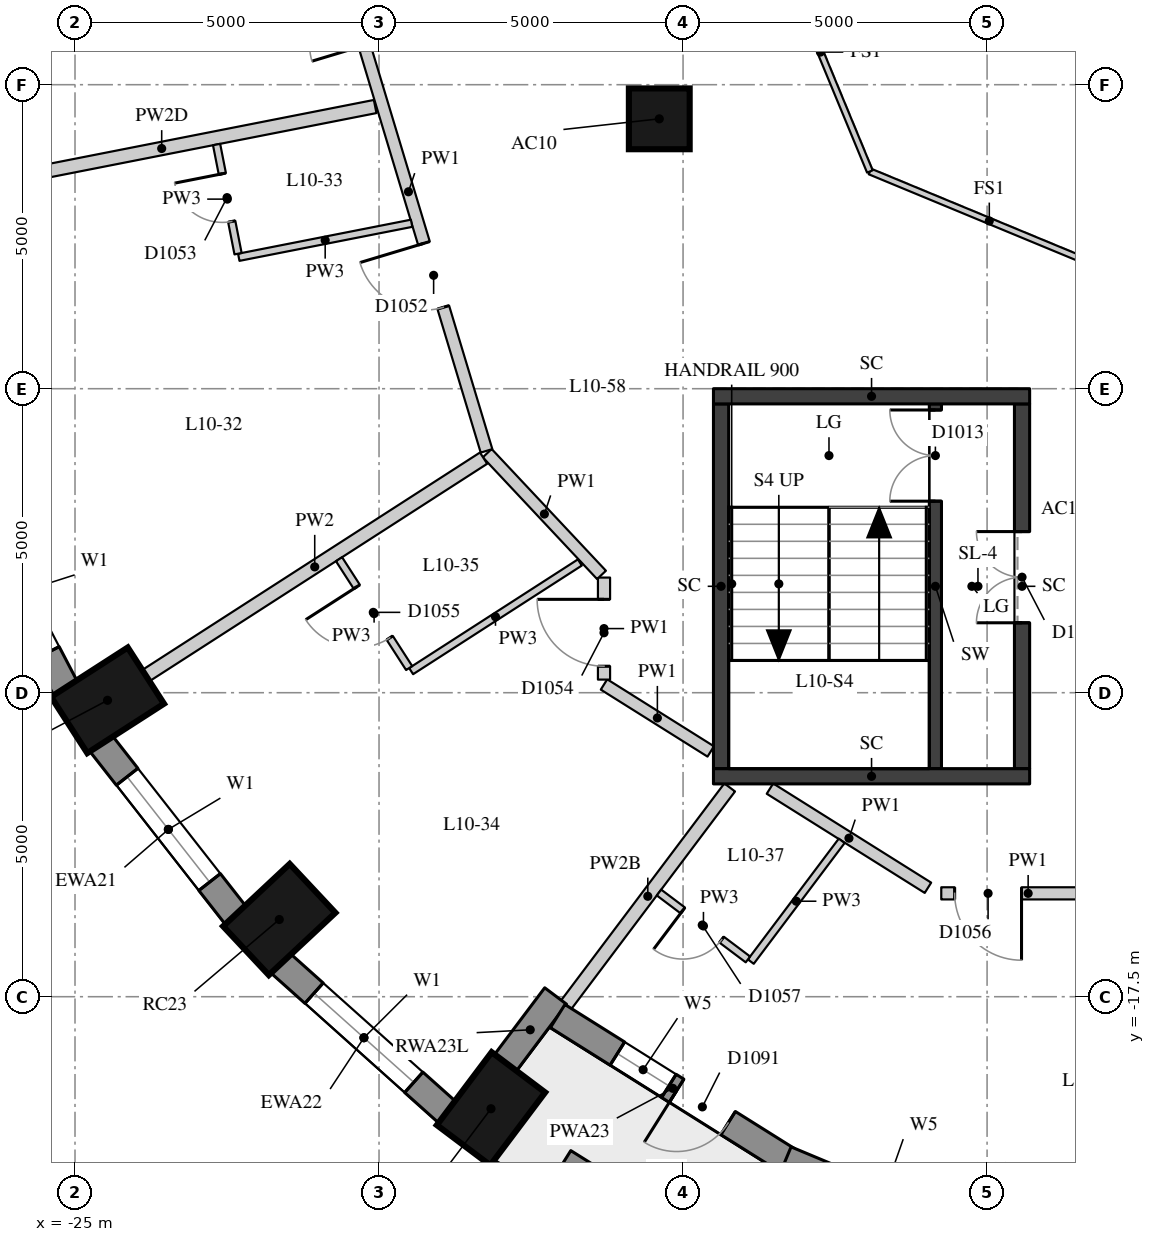
"""IFC4 building model, lengths in metres.
Left out: names, types, materials, properties, quantities, classifications, styles, units other than length and angle.
Written with IfcOpenShell. Run it as: python <this file> out.ifc"""

import sys

from ifc_helpers import new_model, si_unit, direction, frame, frame_2d, origin, origin_2d, place, context, subcontext, project, spatial, rectangle, extrude, element, fill, save


model = new_model("IFC4")
c1 = context("Model", 3, precision=1e-05, world=origin(), true_north=direction((0.0, 1.0)))
c2 = subcontext(c1, "Body", "Model", "MODEL_VIEW")
j1 = project(units=[si_unit("LENGTHUNIT", "METRE"), si_unit("PLANEANGLEUNIT", "RADIAN")], contexts=[c1])
p1 = place(None, origin())
s1 = spatial("IfcSite", under=j1, at=p1, CompositionType="ELEMENT")
p2 = place(p1, origin())
s2 = spatial("IfcBuilding", under=s1, at=p2, CompositionType="ELEMENT")
p3 = place(p2, frame((0.0, 0.0, 41.5)))
s3 = spatial("IfcBuildingStorey", under=s2, at=p3, CompositionType="ELEMENT", Elevation=41.5)
for number, where, z_axis, x_axis in (
    (1, (-24.465, -12.625, 0.0), (0.0, 0.0, 1.0), (-0.841, -0.541, 0.0)),
    (2, (-21.641, -16.23, 0.0), (0.0, 0.0, 1.0), (-0.73, -0.683, 0.0)),
    (3, (-18.159, -19.343, 0.0), (0.0, 0.0, 1.0), (-0.601, -0.799, 0.0)),
):
    element("IfcColumn", number, at=place(p3, frame(where, z_axis=z_axis, x_axis=x_axis)), inside=s3, PredefinedType="COLUMN", context=c2, shape_type="SweptSolid", body=[
        extrude(rectangle(XDim=1.5, YDim=1.1, at=origin_2d()), origin(), (0.0, 0.0, 1.0), 3.3),
    ])
p4 = place(p3, frame((-15.391, -3.062, 0.0), z_axis=(0.0, 0.0, 1.0), x_axis=(1.0, 0.0, 0.0)))
e4 = element("IfcColumn", 4, at=p4, inside=s3, PredefinedType="COLUMN", context=c2, shape_type="SweptSolid", body=[
    extrude(rectangle(XDim=1.0, YDim=1.0, at=origin_2d()), origin(), (0.0, 0.0, 1.0), 3.3),
])
p5 = place(p3, frame((-26.786, -9.305, 0.0), z_axis=(0.0, 0.0, 1.0), x_axis=(0.462492775226, -0.886623050041, 0.0)))
e5 = element("IfcWall", 5, at=p5, inside=s3, PredefinedType="SOLIDWALL", context=c2, shape_type="SweptSolid", body=[
    extrude(rectangle(XDim=3.532, YDim=0.45, at=frame_2d((1.766, 0.0))), origin(), (0.0, 0.0, 1.0), 3.02),
])
p6 = place(p5, frame((0.666, 0.0, 0.4)))
e6 = element("IfcOpeningElement", 6, at=p6, cuts=e5, PredefinedType="OPENING", context=c2, shape_type="SweptSolid", body=[
    extrude(rectangle(XDim=2.2, YDim=1.75, at=frame_2d((1.1, 0.875))), frame((0.0, 0.235, 0.0), z_axis=(0.0, -1.0, 0.0), x_axis=(1.0, 0.0, 0.0)), (0.0, 0.0, 1.0), 0.47),
])
p7 = place(p3, frame((-24.578, -13.328, 0.0), z_axis=(0.0, 0.0, 1.0), x_axis=(0.616661975264, -0.787228053529, 0.0)))
e7 = element("IfcWall", 7, at=p7, inside=s3, PredefinedType="SOLIDWALL", context=c2, shape_type="SweptSolid", body=[
    extrude(rectangle(XDim=3.61, YDim=0.45, at=frame_2d((1.805, 0.0))), origin(), (0.0, 0.0, 1.0), 3.02),
])
p8 = place(p7, frame((0.705, 0.0, 0.4)))
e8 = element("IfcOpeningElement", 8, at=p8, cuts=e7, PredefinedType="OPENING", context=c2, shape_type="SweptSolid", body=[
    extrude(rectangle(XDim=2.2, YDim=1.75, at=frame_2d((1.1, 0.875))), frame((0.0, 0.235, 0.0), z_axis=(0.0, -1.0, 0.0), x_axis=(1.0, 0.0, 0.0)), (0.0, 0.0, 1.0), 0.47),
])
p9 = place(p3, frame((-21.627, -16.943, 0.0), z_axis=(0.0, 0.0, 1.0), x_axis=(0.745526233716, -0.66647628228, 0.0)))
e9 = element("IfcWall", 9, at=p9, inside=s3, PredefinedType="SOLIDWALL", context=c2, shape_type="SweptSolid", body=[
    extrude(rectangle(XDim=3.697, YDim=0.45, at=frame_2d((1.848, 0.0))), origin(), (0.0, 0.0, 1.0), 3.02),
])
p10 = place(p9, frame((0.749, 0.0, 0.4)))
e10 = element("IfcOpeningElement", 10, at=p10, cuts=e9, PredefinedType="OPENING", context=c2, shape_type="SweptSolid", body=[
    extrude(rectangle(XDim=2.2, YDim=1.75, at=frame_2d((1.1, 0.875))), frame((0.0, 0.235, 0.0), z_axis=(0.0, -1.0, 0.0), x_axis=(1.0, 0.0, 0.0)), (0.0, 0.0, 1.0), 0.47),
])
p11 = place(p3, frame((-17.932, -18.6, 0.0), z_axis=(0.0, 0.0, 1.0), x_axis=(0.601262851241, 0.799051302306, 0.0)))
e11 = element("IfcWall", 11, at=p11, inside=s3, PredefinedType="SOLIDWALL", context=c2, shape_type="SweptSolid", body=[
    extrude(rectangle(XDim=1.391, YDim=0.45, at=frame_2d((0.696, 0.0))), origin(), (0.0, 0.0, 1.0), 2.57),
])
p12 = place(p3, frame((-17.062, -17.819, 0.0), z_axis=(0.0, 0.0, 1.0), x_axis=(0.846990101364, -0.531608660757, 0.0)))
e12 = element("IfcWall", 12, at=p12, inside=s3, PredefinedType="SOLIDWALL", context=c2, shape_type="SweptSolid", body=[
    extrude(rectangle(XDim=4.469, YDim=0.45, at=frame_2d((2.234, 0.0))), origin(), (0.0, 0.0, 1.0), 3.02),
])
p13 = place(p12, frame((1.159, 0.0, 0.4)))
e13 = element("IfcOpeningElement", 13, at=p13, cuts=e12, PredefinedType="OPENING", context=c2, shape_type="SweptSolid", body=[
    extrude(rectangle(XDim=1.0, YDim=1.75, at=frame_2d((0.5, 0.875))), frame((0.0, 0.235, 0.0), z_axis=(0.0, -1.0, 0.0), x_axis=(1.0, 0.0, 0.0)), (0.0, 0.0, 1.0), 0.47),
])
p14 = place(p12, frame((2.31, 0.0, 0.0)))
e14 = element("IfcOpeningElement", 14, at=p14, cuts=e12, PredefinedType="OPENING", context=c2, shape_type="SweptSolid", body=[
    extrude(rectangle(XDim=1.0, YDim=2.15, at=frame_2d((0.5, 1.075))), frame((0.0, 0.235, 0.0), z_axis=(0.0, -1.0, 0.0), x_axis=(1.0, 0.0, 0.0)), (0.0, 0.0, 1.0), 0.47),
])
p15 = place(p3, frame((-13.31, -20.178, 0.0), z_axis=(0.0, 0.0, 1.0), x_axis=(0.922634412489, -0.385675693935, 0.0)))
e15 = element("IfcWall", 15, at=p15, inside=s3, PredefinedType="SOLIDWALL", context=c2, shape_type="SweptSolid", body=[
    extrude(rectangle(XDim=4.577, YDim=0.45, at=frame_2d((2.288, 0.0))), origin(), (0.0, 0.0, 1.0), 3.02),
])
p16 = place(p15, frame((1.213, 0.0, 0.4)))
e16 = element("IfcOpeningElement", 16, at=p16, cuts=e15, PredefinedType="OPENING", context=c2, shape_type="SweptSolid", body=[
    extrude(rectangle(XDim=1.0, YDim=1.75, at=frame_2d((0.5, 0.875))), frame((0.0, 0.235, 0.0), z_axis=(0.0, -1.0, 0.0), x_axis=(1.0, 0.0, 0.0)), (0.0, 0.0, 1.0), 0.47),
])
p17 = place(p15, frame((2.363, 0.0, 0.0)))
e17 = element("IfcOpeningElement", 17, at=p17, cuts=e15, PredefinedType="OPENING", context=c2, shape_type="SweptSolid", body=[
    extrude(rectangle(XDim=1.0, YDim=2.15, at=frame_2d((0.5, 1.075))), frame((0.0, 0.235, 0.0), z_axis=(0.0, -1.0, 0.0), x_axis=(1.0, 0.0, 0.0)), (0.0, 0.0, 1.0), 0.47),
])
p18 = place(p3, frame((-17.032, -20.328, 0.0), z_axis=(0.0, 0.0, 1.0), x_axis=(0.847609446823, -0.530620604252, 0.0)))
e18 = element("IfcWall", 18, at=p18, inside=s3, PredefinedType="USERDEFINED", context=c2, shape_type="SweptSolid", body=[
    extrude(rectangle(XDim=1.8, YDim=0.7, at=frame_2d((0.9, 0.0))), origin(), (0.0, 0.0, 1.0), 0.75),
])
p19 = place(p3, frame((-10.85, -13.75, 0.0), z_axis=(0.0, 0.0, 1.0), x_axis=(0.0, 1.0, 0.0)))
e19 = element("IfcWall", 19, at=p19, inside=s3, PredefinedType="SHEAR", context=c2, shape_type="SweptSolid", body=[
    extrude(rectangle(XDim=6.0, YDim=0.2, at=frame_2d((3.0, 0.0))), origin(), (0.0, 0.0, 1.0), 3.02),
])
p20 = place(p19, frame((4.4, 0.0, 0.0)))
e20 = element("IfcOpeningElement", 20, at=p20, cuts=e19, PredefinedType="OPENING", context=c2, shape_type="SweptSolid", body=[
    extrude(rectangle(XDim=1.5, YDim=2.1, at=frame_2d((0.75, 1.05))), frame((0.0, 0.11, 0.0), z_axis=(0.0, -1.0, 0.0), x_axis=(1.0, 0.0, 0.0)), (0.0, 0.0, 1.0), 0.22),
])
p21 = place(p3, frame((-14.375, -13.75, -0.28), z_axis=(0.0, 0.0, 1.0), x_axis=(0.0, 1.0, 0.0)))
e21 = element("IfcWall", 21, at=p21, inside=s3, PredefinedType="SHEAR", context=c2, shape_type="SweptSolid", body=[
    extrude(rectangle(XDim=6.0, YDim=0.25, at=frame_2d((3.0, 0.0))), origin(), (0.0, 0.0, 1.0), 3.3),
])
p22 = place(p3, frame((-9.425, -13.75, -0.28), z_axis=(0.0, 0.0, 1.0), x_axis=(0.0, 1.0, 0.0)))
e22 = element("IfcWall", 22, at=p22, inside=s3, PredefinedType="SHEAR", context=c2, shape_type="SweptSolid", body=[
    extrude(rectangle(XDim=6.0, YDim=0.25, at=frame_2d((3.0, 0.0))), origin(), (0.0, 0.0, 1.0), 3.3),
])
p23 = place(p22, frame((2.4, 0.0, 0.28)))
e23 = element("IfcOpeningElement", 23, at=p23, cuts=e22, PredefinedType="OPENING", context=c2, shape_type="SweptSolid", body=[
    extrude(rectangle(XDim=1.5, YDim=2.1, at=frame_2d((0.75, 1.05))), frame((0.0, 0.135, 0.0), z_axis=(0.0, -1.0, 0.0), x_axis=(1.0, 0.0, 0.0)), (0.0, 0.0, 1.0), 0.27),
])
for number, where, z_axis, x_axis in (
    (24, (-14.5, -7.625, -0.28), (0.0, 0.0, 1.0), (1.0, 0.0, 0.0)),
    (25, (-14.5, -13.875, -0.28), (0.0, 0.0, 1.0), (1.0, 0.0, 0.0)),
):
    element("IfcWall", number, at=place(p3, frame(where, z_axis=z_axis, x_axis=x_axis)), inside=s3, PredefinedType="SHEAR", context=c2, shape_type="SweptSolid", body=[
        extrude(rectangle(XDim=5.2, YDim=0.25, at=frame_2d((2.6, 0.0))), origin(), (0.0, 0.0, 1.0), 3.3),
    ])
p24 = place(p3, frame((-14.545, -13.466, 0.0), z_axis=(0.0, 0.0, 1.0), x_axis=(-0.846977572949, 0.53162862124, 0.0)))
e26 = element("IfcWall", 26, at=p24, inside=s3, PredefinedType="PARTITIONING", context=c2, shape_type="SweptSolid", body=[
    extrude(rectangle(XDim=2.073, YDim=0.2, at=frame_2d((1.036, 0.0))), origin(), (0.0, 0.0, 1.0), 3.02),
])
p25 = place(p3, frame((-16.3, -12.284, 0.0), z_axis=(0.0, 0.0, 1.0), x_axis=(0.0, 1.0, 0.0)))
e27 = element("IfcWall", 27, at=p25, inside=s3, PredefinedType="PARTITIONING", context=c2, shape_type="SweptSolid", body=[
    extrude(rectangle(XDim=1.678, YDim=0.2, at=frame_2d((0.839, 0.0))), origin(), (0.0, 0.0, 1.0), 3.02),
])
p26 = place(p25, frame((0.22, 0.0, 0.0)))
e28 = element("IfcOpeningElement", 28, at=p26, cuts=e27, PredefinedType="OPENING", context=c2, shape_type="SweptSolid", body=[
    extrude(rectangle(XDim=1.1, YDim=2.1, at=frame_2d((0.55, 1.05))), frame((0.0, 0.11, 0.0), z_axis=(0.0, -1.0, 0.0), x_axis=(1.0, 0.0, 0.0)), (0.0, 0.0, 1.0), 0.22),
])
p27 = place(p3, frame((-16.341, -10.562, 0.0), z_axis=(0.0, 0.0, 1.0), x_axis=(-0.684393472021, 0.729112868803, 0.0)))
e29 = element("IfcWall", 29, at=p27, inside=s3, PredefinedType="PARTITIONING", context=c2, shape_type="SweptSolid", body=[
    extrude(rectangle(XDim=2.746, YDim=0.2, at=frame_2d((1.373, 0.0))), origin(), (0.0, 0.0, 1.0), 3.02),
])
p28 = place(p3, frame((-18.232, -8.522, 0.0), z_axis=(0.0, 0.0, 1.0), x_axis=(-0.288502732396, 0.957479072043, 0.0)))
e30 = element("IfcWall", 30, at=p28, inside=s3, PredefinedType="PARTITIONING", context=c2, shape_type="SweptSolid", body=[
    extrude(rectangle(XDim=8.901, YDim=0.2, at=frame_2d((4.45, 0.0))), origin(), (0.0, 0.0, 1.0), 3.02),
])
p29 = place(p28, frame((6.965, 0.0, 0.0)))
e31 = element("IfcOpeningElement", 31, at=p29, cuts=e30, PredefinedType="OPENING", context=c2, shape_type="SweptSolid", body=[
    extrude(rectangle(XDim=0.9, YDim=2.1, at=frame_2d((0.45, 1.05))), frame((0.0, 0.11, 0.0), z_axis=(0.0, -1.0, 0.0), x_axis=(1.0, 0.0, 0.0)), (0.0, 0.0, 1.0), 0.22),
])
p30 = place(p28, frame((2.465, 0.0, 0.0)))
e32 = element("IfcOpeningElement", 32, at=p30, cuts=e30, PredefinedType="OPENING", context=c2, shape_type="SweptSolid", body=[
    extrude(rectangle(XDim=1.1, YDim=2.1, at=frame_2d((0.55, 1.05))), frame((0.0, 0.11, 0.0), z_axis=(0.0, -1.0, 0.0), x_axis=(1.0, 0.0, 0.0)), (0.0, 0.0, 1.0), 0.22),
])
p31 = place(p3, frame((-7.896, -15.8, 0.0), z_axis=(0.0, 0.0, 1.0), x_axis=(-1.0, 0.0, 0.0)))
e33 = element("IfcWall", 33, at=p31, inside=s3, PredefinedType="PARTITIONING", context=c2, shape_type="SweptSolid", body=[
    extrude(rectangle(XDim=2.858, YDim=0.2, at=frame_2d((1.429, 0.0))), origin(), (0.0, 0.0, 1.0), 3.02),
])
p32 = place(p31, frame((1.538, 0.0, 0.0)))
e34 = element("IfcOpeningElement", 34, at=p32, cuts=e33, PredefinedType="OPENING", context=c2, shape_type="SweptSolid", body=[
    extrude(rectangle(XDim=1.1, YDim=2.1, at=frame_2d((0.55, 1.05))), frame((0.0, 0.11, 0.0), z_axis=(0.0, -1.0, 0.0), x_axis=(1.0, 0.0, 0.0)), (0.0, 0.0, 1.0), 0.22),
])
p33 = place(p3, frame((-10.972, -15.708, 0.0), z_axis=(0.0, 0.0, 1.0), x_axis=(-0.846954991261, 0.53166459613, 0.0)))
e35 = element("IfcWall", 35, at=p33, inside=s3, PredefinedType="PARTITIONING", context=c2, shape_type="SweptSolid", body=[
    extrude(rectangle(XDim=3.068, YDim=0.2, at=frame_2d((1.534, 0.0))), origin(), (0.0, 0.0, 1.0), 3.02),
])
p34 = place(p3, frame((-27.085, -4.24, 0.0), z_axis=(0.0, 0.0, 1.0), x_axis=(0.981197740145, 0.193005167635, 0.0)))
e36 = element("IfcWall", 36, at=p34, inside=s3, PredefinedType="PARTITIONING", context=c2, shape_type="SweptSolid", body=[
    extrude(rectangle(XDim=7.156, YDim=0.22, at=frame_2d((3.578, 0.0))), origin(), (0.0, 0.0, 1.0), 2.47),
])
p35 = place(p3, frame((-23.835, -12.219, 0.0), z_axis=(0.0, 0.0, 1.0), x_axis=(0.840757959101, 0.541411169268, 0.0)))
e37 = element("IfcWall", 37, at=p35, inside=s3, PredefinedType="PARTITIONING", context=c2, shape_type="SweptSolid", body=[
    extrude(rectangle(XDim=6.606, YDim=0.22, at=frame_2d((3.303, 0.0))), origin(), (0.0, 0.0, 1.0), 3.02),
])
p36 = place(p3, frame((-16.927, -17.638, 0.0), z_axis=(0.0, 0.0, 1.0), x_axis=(0.601158965663, 0.799129462605, 0.0)))
e38 = element("IfcWall", 38, at=p36, inside=s3, PredefinedType="PARTITIONING", context=c2, shape_type="SweptSolid", body=[
    extrude(rectangle(XDim=4.48, YDim=0.22, at=frame_2d((2.24, 0.0))), origin(), (0.0, 0.0, 1.0), 2.57),
])
p37 = place(p3, frame((-19.464, -4.779, 0.0), z_axis=(0.0, 0.0, 1.0), x_axis=(-0.981185297697, -0.193068411666, 0.0)))
e39 = element("IfcWall", 39, at=p37, inside=s3, PredefinedType="PARTITIONING", context=c2, shape_type="SweptSolid", body=[
    extrude(rectangle(XDim=2.897, YDim=0.12, at=frame_2d((1.448, 0.0))), origin(), (0.0, 0.0, 1.0), 3.02),
])
p38 = place(p3, frame((-16.697, -10.358, 0.0), z_axis=(0.0, 0.0, 1.0), x_axis=(-0.84073116979, -0.541452768156, 0.0)))
e40 = element("IfcWall", 40, at=p38, inside=s3, PredefinedType="PARTITIONING", context=c2, shape_type="SweptSolid", body=[
    extrude(rectangle(XDim=3.301, YDim=0.12, at=frame_2d((1.65, 0.0))), origin(), (0.0, 0.0, 1.0), 3.02),
])
p39 = place(p3, frame((-12.391, -14.936, 0.0), z_axis=(0.0, 0.0, 1.0), x_axis=(-0.601209195786, -0.799091673654, 0.0)))
e41 = element("IfcWall", 41, at=p39, inside=s3, PredefinedType="PARTITIONING", context=c2, shape_type="SweptSolid", body=[
    extrude(rectangle(XDim=2.486, YDim=0.12, at=frame_2d((1.243, 0.0))), origin(), (0.0, 0.0, 1.0), 3.02),
])
p40 = place(p3, frame((-22.318, -5.28, 0.0), z_axis=(0.0, 0.0, 1.0), x_axis=(-0.193036598643, 0.981191557029, 0.0)))
e42 = element("IfcWall", 42, at=p40, inside=s3, PredefinedType="PARTITIONING", context=c2, shape_type="SweptSolid", body=[
    extrude(rectangle(XDim=1.83, YDim=0.12, at=frame_2d((0.915, 0.0))), origin(), (0.0, 0.0, 1.0), 3.02),
])
p41 = place(p40, frame((0.54, 0.0, 0.0)))
e43 = element("IfcOpeningElement", 43, at=p41, cuts=e42, PredefinedType="OPENING", context=c2, shape_type="SweptSolid", body=[
    extrude(rectangle(XDim=0.8, YDim=2.1, at=frame_2d((0.4, 1.05))), frame((0.0, 0.07, 0.0), z_axis=(0.0, -1.0, 0.0), x_axis=(1.0, 0.0, 0.0)), (0.0, 0.0, 1.0), 0.14),
])
p42 = place(p3, frame((-19.504, -12.095, 0.0), z_axis=(0.0, 0.0, 1.0), x_axis=(-0.541591545821, 0.840641777153, 0.0)))
e44 = element("IfcWall", 44, at=p42, inside=s3, PredefinedType="PARTITIONING", context=c2, shape_type="SweptSolid", body=[
    extrude(rectangle(XDim=2.13, YDim=0.12, at=frame_2d((1.065, 0.0))), origin(), (0.0, 0.0, 1.0), 3.02),
])
p43 = place(p42, frame((0.59, 0.0, 0.0)))
e45 = element("IfcOpeningElement", 45, at=p43, cuts=e44, PredefinedType="OPENING", context=c2, shape_type="SweptSolid", body=[
    extrude(rectangle(XDim=1.0, YDim=2.1, at=frame_2d((0.5, 1.05))), frame((0.0, 0.07, 0.0), z_axis=(0.0, -1.0, 0.0), x_axis=(1.0, 0.0, 0.0)), (0.0, 0.0, 1.0), 0.14),
])
p44 = place(p3, frame((-13.933, -16.887, 0.0), z_axis=(0.0, 0.0, 1.0), x_axis=(-0.799134663307, 0.601152052231, 0.0)))
e46 = element("IfcWall", 46, at=p44, inside=s3, PredefinedType="PARTITIONING", context=c2, shape_type="SweptSolid", body=[
    extrude(rectangle(XDim=1.83, YDim=0.12, at=frame_2d((0.915, 0.0))), origin(), (0.0, 0.0, 1.0), 3.02),
])
p45 = place(p44, frame((0.54, 0.0, 0.0)))
e47 = element("IfcOpeningElement", 47, at=p45, cuts=e46, PredefinedType="OPENING", context=c2, shape_type="SweptSolid", body=[
    extrude(rectangle(XDim=0.8, YDim=2.1, at=frame_2d((0.4, 1.05))), frame((0.0, 0.07, 0.0), z_axis=(0.0, -1.0, 0.0), x_axis=(1.0, 0.0, 0.0)), (0.0, 0.0, 1.0), 0.14),
])
for number, where, z_axis, x_axis in (
    (48, (-8.0, -5.554, 0.0), (0.0, 0.0, 1.0), (-0.924, 0.383, 0.0)),
    (49, (-11.927, -3.927, 0.0), (0.0, 0.0, 1.0), (-0.383, 0.924, 0.0)),
):
    element("IfcWall", number, at=place(p3, frame(where, z_axis=z_axis, x_axis=x_axis)), inside=s3, PredefinedType="PARTITIONING", context=c2, shape_type="SweptSolid", body=[
        extrude(rectangle(XDim=4.251, YDim=0.1, at=frame_2d((2.125, 0.0))), origin(), (0.0, 0.0, 1.0), 3.02),
    ])
p46 = place(p8, origin())
e50 = element("IfcWindow", 50, at=p46, inside=s3, PartitioningType="SINGLE_PANEL", PredefinedType="WINDOW", context=c2, shape_type="SweptSolid", body=[
    extrude(rectangle(XDim=2.2, YDim=1.75, at=frame_2d((1.1, 0.875))), frame((0.0, 0.035, 0.0), z_axis=(0.0, -1.0, 0.0), x_axis=(1.0, 0.0, 0.0)), (0.0, 0.0, 1.0), 0.06),
])
fill(e8, e50)
p47 = place(p10, origin())
e51 = element("IfcWindow", 51, at=p47, inside=s3, PartitioningType="SINGLE_PANEL", PredefinedType="WINDOW", context=c2, shape_type="SweptSolid", body=[
    extrude(rectangle(XDim=2.2, YDim=1.75, at=frame_2d((1.1, 0.875))), frame((0.0, 0.035, 0.0), z_axis=(0.0, -1.0, 0.0), x_axis=(1.0, 0.0, 0.0)), (0.0, 0.0, 1.0), 0.06),
])
fill(e10, e51)
p48 = place(p13, origin())
e52 = element("IfcWindow", 52, at=p48, inside=s3, PartitioningType="SINGLE_PANEL", PredefinedType="WINDOW", context=c2, shape_type="SweptSolid", body=[
    extrude(rectangle(XDim=1.0, YDim=1.75, at=frame_2d((0.5, 0.875))), frame((0.0, 0.035, 0.0), z_axis=(0.0, -1.0, 0.0), x_axis=(1.0, 0.0, 0.0)), (0.0, 0.0, 1.0), 0.06),
])
fill(e13, e52)
p49 = place(p14, frame((1.0, 0.0, 0.0), z_axis=(0.0, 0.0, 1.0), x_axis=(-1.0, 0.0, 0.0)))
e53 = element("IfcDoor", 53, at=p49, inside=s3, OperationType="SINGLE_SWING_RIGHT", PredefinedType="DOOR", context=c2, shape_type="SweptSolid", body=[
    extrude(rectangle(XDim=1.0, YDim=2.15, at=frame_2d((0.5, 1.075))), frame((0.0, 0.075, 0.0), z_axis=(0.0, -1.0, 0.0), x_axis=(1.0, 0.0, 0.0)), (0.0, 0.0, 1.0), 0.05),
])
fill(e14, e53)
p50 = place(p20, origin())
e54 = element("IfcDoor", 54, at=p50, inside=s3, OperationType="DOUBLE_DOOR_SINGLE_SWING", PredefinedType="DOOR", context=c2, shape_type="SweptSolid", body=[
    extrude(rectangle(XDim=1.5, YDim=2.1, at=frame_2d((0.75, 1.05))), frame((0.0, 0.025, 0.0), z_axis=(0.0, -1.0, 0.0), x_axis=(1.0, 0.0, 0.0)), (0.0, 0.0, 1.0), 0.05),
])
fill(e20, e54)
p51 = place(p23, origin())
e55 = element("IfcDoor", 55, at=p51, inside=s3, OperationType="DOUBLE_DOOR_SINGLE_SWING", PredefinedType="DOOR", context=c2, shape_type="SweptSolid", body=[
    extrude(rectangle(XDim=1.5, YDim=2.1, at=frame_2d((0.75, 1.05))), frame((0.0, 0.025, 0.0), z_axis=(0.0, -1.0, 0.0), x_axis=(1.0, 0.0, 0.0)), (0.0, 0.0, 1.0), 0.05),
])
fill(e23, e55)
p52 = place(p30, origin())
e56 = element("IfcDoor", 56, at=p52, inside=s3, OperationType="SINGLE_SWING_RIGHT", PredefinedType="DOOR", context=c2, shape_type="SweptSolid", body=[
    extrude(rectangle(XDim=1.1, YDim=2.1, at=frame_2d((0.55, 1.05))), frame((0.0, 0.025, 0.0), z_axis=(0.0, -1.0, 0.0), x_axis=(1.0, 0.0, 0.0)), (0.0, 0.0, 1.0), 0.05),
])
fill(e32, e56)
p53 = place(p41, origin())
e57 = element("IfcDoor", 57, at=p53, inside=s3, OperationType="SINGLE_SWING_RIGHT", PredefinedType="DOOR", context=c2, shape_type="SweptSolid", body=[
    extrude(rectangle(XDim=0.8, YDim=2.1, at=frame_2d((0.4, 1.05))), frame((0.0, 0.025, 0.0), z_axis=(0.0, -1.0, 0.0), x_axis=(1.0, 0.0, 0.0)), (0.0, 0.0, 1.0), 0.05),
])
fill(e43, e57)
p54 = place(p26, origin())
e58 = element("IfcDoor", 58, at=p54, inside=s3, OperationType="SINGLE_SWING_RIGHT", PredefinedType="DOOR", context=c2, shape_type="SweptSolid", body=[
    extrude(rectangle(XDim=1.1, YDim=2.1, at=frame_2d((0.55, 1.05))), frame((0.0, 0.025, 0.0), z_axis=(0.0, -1.0, 0.0), x_axis=(1.0, 0.0, 0.0)), (0.0, 0.0, 1.0), 0.05),
])
fill(e28, e58)
p55 = place(p43, origin())
e59 = element("IfcDoor", 59, at=p55, inside=s3, OperationType="SINGLE_SWING_RIGHT", PredefinedType="DOOR", context=c2, shape_type="SweptSolid", body=[
    extrude(rectangle(XDim=1.0, YDim=2.1, at=frame_2d((0.5, 1.05))), frame((0.0, 0.025, 0.0), z_axis=(0.0, -1.0, 0.0), x_axis=(1.0, 0.0, 0.0)), (0.0, 0.0, 1.0), 0.05),
])
fill(e45, e59)
p56 = place(p32, origin())
e60 = element("IfcDoor", 60, at=p56, inside=s3, OperationType="SINGLE_SWING_LEFT", PredefinedType="DOOR", context=c2, shape_type="SweptSolid", body=[
    extrude(rectangle(XDim=1.1, YDim=2.1, at=frame_2d((0.55, 1.05))), frame((0.0, 0.025, 0.0), z_axis=(0.0, -1.0, 0.0), x_axis=(1.0, 0.0, 0.0)), (0.0, 0.0, 1.0), 0.05),
])
fill(e34, e60)
p57 = place(p45, origin())
e61 = element("IfcDoor", 61, at=p57, inside=s3, OperationType="SINGLE_SWING_RIGHT", PredefinedType="DOOR", context=c2, shape_type="SweptSolid", body=[
    extrude(rectangle(XDim=0.8, YDim=2.1, at=frame_2d((0.4, 1.05))), frame((0.0, 0.025, 0.0), z_axis=(0.0, -1.0, 0.0), x_axis=(1.0, 0.0, 0.0)), (0.0, 0.0, 1.0), 0.05),
])
fill(e47, e61)
save(model, sys.argv[1])
